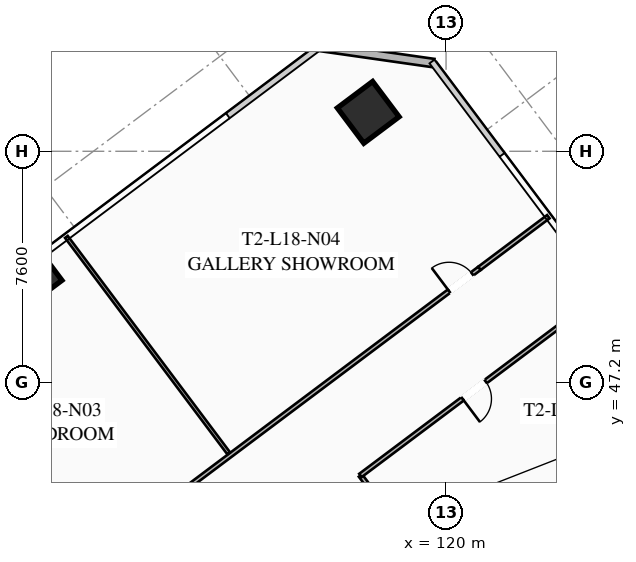
"""IFC4 building model, lengths in metres.
Left out: names, types, materials, properties, quantities, classifications, styles, units other than length and angle.
Written with IfcOpenShell. Run it as: python <this file> out.ifc"""

import sys

from ifc_helpers import new_model, si_unit, direction, frame, frame_2d, origin, origin_2d, place, context, subcontext, project, spatial, rectangle, hollow_rectangle, extrude, element, fill, save


model = new_model("IFC4")
c1 = context("Model", 3, precision=1e-05, world=origin(), true_north=direction((0.0, 1.0)))
c2 = subcontext(c1, "Body", "Model", "MODEL_VIEW")
j1 = project(units=[si_unit("LENGTHUNIT", "METRE"), si_unit("PLANEANGLEUNIT", "RADIAN")], contexts=[c1])
p1 = place(None, origin())
s1 = spatial("IfcSite", under=j1, at=p1, CompositionType="ELEMENT")
p2 = place(p1, origin())
s2 = spatial("IfcBuilding", under=s1, at=p2, CompositionType="ELEMENT")
p3 = place(p2, frame((0.0, 0.0, 70.75)))
s3 = spatial("IfcBuildingStorey", under=s2, at=p3, CompositionType="ELEMENT", Elevation=70.75)
p4 = place(p3, frame((117.44, 56.08, 0.0), z_axis=(0.0, 0.0, 1.0), x_axis=(0.799999996291, 0.600000004945, 0.0)))
e1 = element("IfcColumn", 1, at=p4, inside=s3, PredefinedType="COLUMN", context=c2, shape_type="SweptSolid", body=[
    extrude(hollow_rectangle(XDim=1.45, YDim=1.45, WallThickness=0.055, at=origin_2d()), origin(), (0.0, 0.0, 1.0), 3.35),
])
p5 = place(p3, frame((106.77, 50.64, 0.0), z_axis=(0.0, 0.0, 1.0), x_axis=(0.799999996291, 0.600000004945, 0.0)))
e2 = element("IfcColumn", 2, at=p5, inside=s3, PredefinedType="COLUMN", context=c2, shape_type="SweptSolid", body=[
    extrude(hollow_rectangle(XDim=0.85, YDim=0.85, WallThickness=0.035, at=origin_2d()), origin(), (0.0, 0.0, 1.0), 3.35),
])
p6 = place(p3, frame((115.82, 58.24, 0.0), z_axis=(0.0, 0.0, 1.0), x_axis=(0.989948214866, -0.141430307517, 0.0)))
e3 = element("IfcWall", 3, at=p6, inside=s3, PredefinedType="SOLIDWALL", context=c2, shape_type="SweptSolid", body=[
    extrude(rectangle(XDim=3.818, YDim=0.28, at=frame_2d((1.909, 0.0))), origin(), (0.0, 0.0, 1.0), 3.35),
])
p7 = place(p3, frame((119.824, 40.618, 0.0), z_axis=(0.0, 0.0, 1.0), x_axis=(-0.599982243973, 0.800013316712, 0.0)))
e4 = element("IfcWall", 4, at=p7, inside=s3, PredefinedType="PARTITIONING", context=c2, shape_type="SweptSolid", body=[
    extrude(rectangle(XDim=4.4, YDim=0.135, at=frame_2d((2.2, 0.0))), origin(), (0.0, 0.0, 1.0), 2.703),
])
p8 = place(p3, frame((98.516, 34.012, 0.0), z_axis=(0.0, 0.0, 1.0), x_axis=(0.8, 0.6, 0.0)))
e5 = element("IfcWall", 5, at=p8, inside=s3, PredefinedType="PARTITIONING", context=c2, shape_type="SweptSolid", body=[
    extrude(rectangle(XDim=28.23, YDim=0.135, at=frame_2d((14.115, 0.0))), origin(), (0.0, 0.0, 1.0), 2.703),
])
p9 = place(p8, frame((0.3, 0.0, 0.0)))
e6 = element("IfcOpeningElement", 6, at=p9, cuts=e5, PredefinedType="OPENING", context=c2, shape_type="SweptSolid", body=[
    extrude(rectangle(XDim=0.95, YDim=2.05, at=frame_2d((0.475, 1.025))), frame((0.0, 0.077, 0.0), z_axis=(0.0, -1.0, 0.0), x_axis=(1.0, 0.0, 0.0)), (0.0, 0.0, 1.0), 0.155),
])
p10 = place(p8, frame((6.84, 0.0, 0.0)))
e7 = element("IfcOpeningElement", 7, at=p10, cuts=e5, PredefinedType="OPENING", context=c2, shape_type="SweptSolid", body=[
    extrude(rectangle(XDim=0.95, YDim=2.05, at=frame_2d((0.475, 1.025))), frame((0.0, 0.077, 0.0), z_axis=(0.0, -1.0, 0.0), x_axis=(1.0, 0.0, 0.0)), (0.0, 0.0, 1.0), 0.155),
])
p11 = place(p8, frame((10.863, 0.0, 0.0)))
e8 = element("IfcOpeningElement", 8, at=p11, cuts=e5, PredefinedType="OPENING", context=c2, shape_type="SweptSolid", body=[
    extrude(rectangle(XDim=0.95, YDim=2.05, at=frame_2d((0.475, 1.025))), frame((0.0, 0.077, 0.0), z_axis=(0.0, -1.0, 0.0), x_axis=(1.0, 0.0, 0.0)), (0.0, 0.0, 1.0), 0.155),
])
p12 = place(p8, frame((26.98, 0.0, 0.0)))
e9 = element("IfcOpeningElement", 9, at=p12, cuts=e5, PredefinedType="OPENING", context=c2, shape_type="SweptSolid", body=[
    extrude(rectangle(XDim=0.95, YDim=2.05, at=frame_2d((0.475, 1.025))), frame((0.0, 0.077, 0.0), z_axis=(0.0, -1.0, 0.0), x_axis=(1.0, 0.0, 0.0)), (0.0, 0.0, 1.0), 0.155),
])
p13 = place(p3, frame((121.1, 50.95, 0.0), z_axis=(0.0, 0.0, 1.0), x_axis=(0.799989647378, 0.600013803248, 0.0)))
e10 = element("IfcWall", 10, at=p13, inside=s3, PredefinedType="PARTITIONING", context=c2, shape_type="SweptSolid", body=[
    extrude(rectangle(XDim=2.83, YDim=0.135, at=frame_2d((1.415, 0.0))), origin(), (0.0, 0.0, 1.0), 2.703),
])
p14 = place(p3, frame((112.852, 44.864, 0.0), z_axis=(0.0, 0.0, 1.0), x_axis=(-0.600013167126, 0.799990124486, 0.0)))
e11 = element("IfcWall", 11, at=p14, inside=s3, PredefinedType="PARTITIONING", context=c2, shape_type="SweptSolid", body=[
    extrude(rectangle(XDim=8.9, YDim=0.11, at=frame_2d((4.45, 0.0))), origin(), (0.0, 0.0, 1.0), 2.703),
])
p15 = place(p3, frame((125.224, 50.168, 0.0), z_axis=(0.0, 0.0, 1.0), x_axis=(-0.8, -0.6, 0.0)))
e12 = element("IfcWall", 12, at=p15, inside=s3, PredefinedType="PARTITIONING", context=c2, shape_type="SweptSolid", body=[
    extrude(rectangle(XDim=10.05, YDim=0.135, at=frame_2d((5.025, 0.0))), origin(), (0.0, 0.0, 1.0), 2.703),
])
p16 = place(p15, frame((4.9, 0.0, 0.0)))
e13 = element("IfcOpeningElement", 13, at=p16, cuts=e12, PredefinedType="OPENING", context=c2, shape_type="SweptSolid", body=[
    extrude(rectangle(XDim=0.95, YDim=2.05, at=frame_2d((0.475, 1.025))), frame((0.0, 0.077, 0.0), z_axis=(0.0, -1.0, 0.0), x_axis=(1.0, 0.0, 0.0)), (0.0, 0.0, 1.0), 0.155),
])
p17 = place(p3, frame((127.864, 46.648, 0.0), z_axis=(0.0, 0.0, 1.0), x_axis=(-0.800007145523, -0.599990472518, 0.0)))
e14 = element("IfcWall", 14, at=p17, inside=s3, PredefinedType="PARTITIONING", context=c2, shape_type="SweptSolid", body=[
    extrude(rectangle(XDim=8.2, YDim=0.11, at=frame_2d((4.1, 0.0))), origin(), (0.0, 0.0, 1.0), 2.703),
])
p18 = place(p12, origin())
e15 = element("IfcDoor", 15, at=p18, inside=s3, OperationType="SINGLE_SWING_LEFT", PredefinedType="DOOR", context=c2, shape_type="SweptSolid", body=[
    extrude(rectangle(XDim=0.95, YDim=2.05, at=frame_2d((0.475, 1.025))), frame((0.0, 0.025, 0.0), z_axis=(0.0, -1.0, 0.0), x_axis=(1.0, 0.0, 0.0)), (0.0, 0.0, 1.0), 0.05),
])
fill(e9, e15)
p19 = place(p16, origin())
e16 = element("IfcDoor", 16, at=p19, inside=s3, OperationType="SINGLE_SWING_RIGHT", PredefinedType="DOOR", context=c2, shape_type="SweptSolid", body=[
    extrude(rectangle(XDim=0.95, YDim=2.05, at=frame_2d((0.475, 1.025))), frame((0.0, 0.025, 0.0), z_axis=(0.0, -1.0, 0.0), x_axis=(1.0, 0.0, 0.0)), (0.0, 0.0, 1.0), 0.05),
])
fill(e13, e16)
save(model, sys.argv[1])
